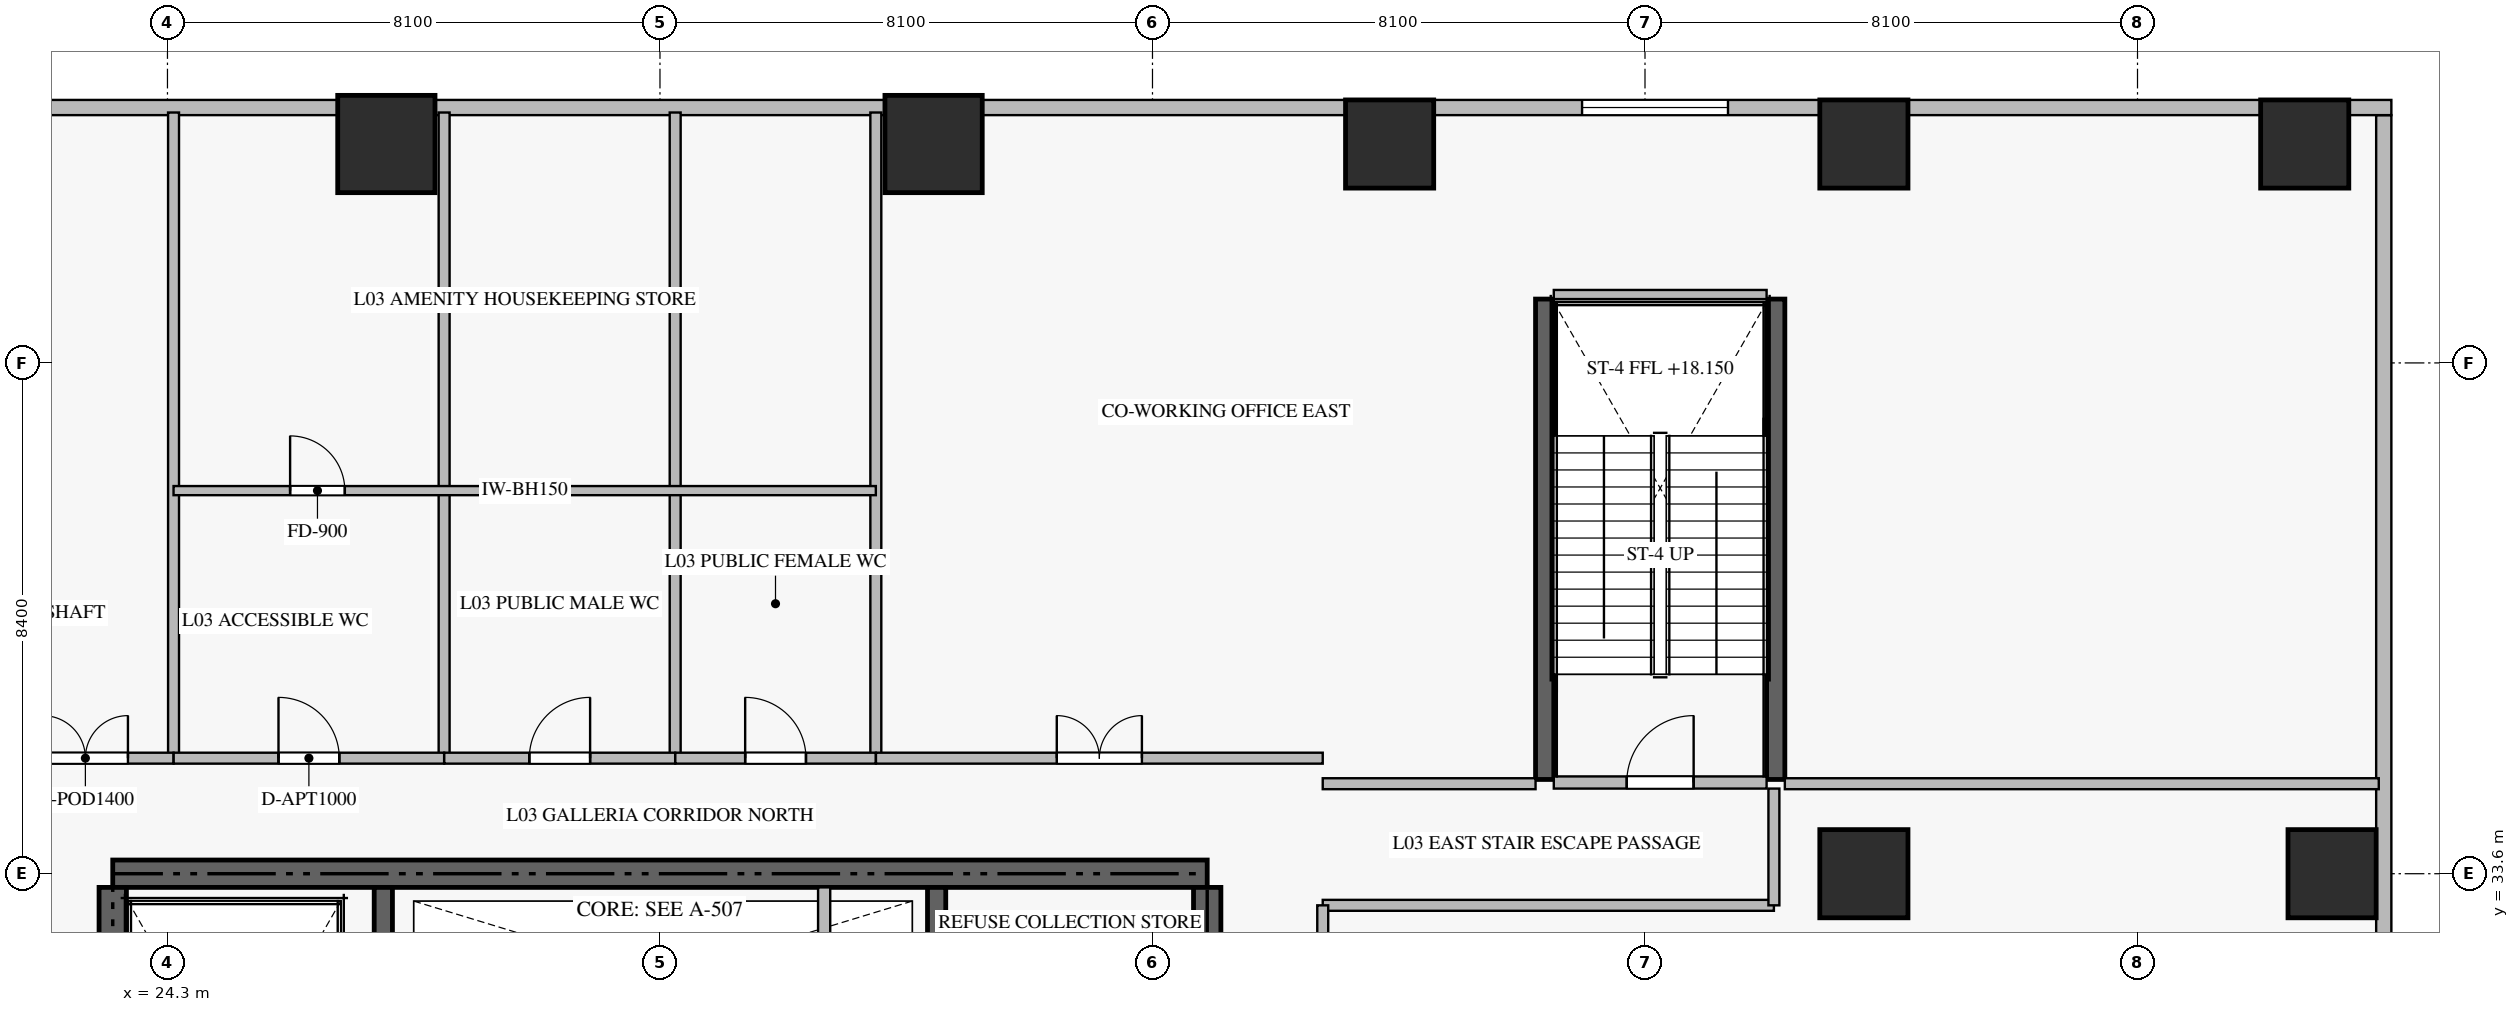
"""IFC4 building model, lengths in metres.
Left out: names, types, materials, properties, quantities, classifications, styles, units other than length and angle.
Written with IfcOpenShell. Run it as: python <this file> out.ifc"""

import sys

from ifc_helpers import new_model, si_unit, direction, frame, frame_2d, origin, origin_2d, place, context, subcontext, project, spatial, rectangle, extrude, source, transform, mapped, element, fill, save


model = new_model("IFC4")
c1 = context("Model", 3, precision=1e-05, world=origin(), true_north=direction((0.0, 1.0)))
c2 = subcontext(c1, "Body", "Model", "MODEL_VIEW")
j1 = project(units=[si_unit("LENGTHUNIT", "METRE"), si_unit("PLANEANGLEUNIT", "RADIAN")], contexts=[c1])
p1 = place(None, origin())
s1 = spatial("IfcSite", under=j1, at=p1, CompositionType="ELEMENT")
p2 = place(p1, origin())
s2 = spatial("IfcBuilding", under=s1, at=p2, CompositionType="ELEMENT")
p3 = place(p2, frame((0.0, 0.0, 15.3)))
s3 = spatial("IfcBuildingStorey", under=s2, at=p3, CompositionType="ELEMENT", Elevation=15.3)
p4 = place(p3, frame((41.4, 33.6, -0.38), z_axis=(0.0, 0.0, 1.0), x_axis=(-1.0, 0.0, 0.0)))
e1 = element("IfcWall", 1, at=p4, inside=s3, PredefinedType="SHEAR", context=c2, shape_type="SweptSolid", body=[
    extrude(rectangle(XDim=18.0, YDim=0.45, at=frame_2d((9.0, 0.0))), origin(), (0.0, 0.0, 1.0), 5.228),
])
p5 = place(p3, frame((23.4, 24.25, -0.38), z_axis=(0.0, 0.0, 1.0), x_axis=(0.0, 1.0, 0.0)))
e2 = element("IfcWall", 2, at=p5, inside=s3, PredefinedType="SHEAR", context=c2, shape_type="SweptSolid", body=[
    extrude(rectangle(XDim=9.125, YDim=0.45, at=frame_2d((4.562, 0.0))), origin(), (0.0, 0.0, 1.0), 5.228),
])
p6 = place(p3, frame((41.4, 27.75, -0.38), z_axis=(0.0, 0.0, 1.0), x_axis=(0.0, 1.0, 0.0)))
e3 = element("IfcWall", 3, at=p6, inside=s3, PredefinedType="SHEAR", context=c2, shape_type="SweptSolid", body=[
    extrude(rectangle(XDim=5.625, YDim=0.45, at=frame_2d((2.812, 0.0))), origin(), (0.0, 0.0, 1.0), 5.228),
])
p7 = place(p3, frame((27.85, 23.55, -0.38), z_axis=(0.0, 0.0, 1.0), x_axis=(0.0, 1.0, 0.0)))
e4 = element("IfcWall", 4, at=p7, inside=s3, PredefinedType="SHEAR", context=c2, shape_type="SweptSolid", body=[
    extrude(rectangle(XDim=9.825, YDim=0.3, at=frame_2d((4.913, 0.0))), origin(), (0.0, 0.0, 1.0), 5.228),
])
p8 = place(p3, frame((36.95, 27.05, -0.38), z_axis=(0.0, 0.0, 1.0), x_axis=(0.0, 1.0, 0.0)))
e5 = element("IfcWall", 5, at=p8, inside=s3, PredefinedType="SHEAR", context=c2, shape_type="SweptSolid", body=[
    extrude(rectangle(XDim=6.325, YDim=0.3, at=frame_2d((3.163, 0.0))), origin(), (0.0, 0.0, 1.0), 5.228),
])
m1 = source(origin(), c2, "Body", "SweptSolid", [
    extrude(rectangle(XDim=1.6, YDim=1.6, at=origin_2d()), origin(), (0.0, 0.0, 1.0), 5.23),
])
for number, where, z_axis, x_axis in (
    (6, (27.9, 45.6, -0.38), (0.0, 0.0, 1.0), (1.0, 0.0, 0.0)),
    (7, (36.9, 45.6, -0.38), (0.0, 0.0, 1.0), (1.0, 0.0, 0.0)),
):
    element("IfcColumn", number, at=place(p3, frame(where, z_axis=z_axis, x_axis=x_axis)), inside=s3, PredefinedType="COLUMN", context=c2, shape_type="MappedRepresentation", body=[
        mapped(m1, transform((0.0, 0.0, 0.0), scale=1.0)),
    ])
m2 = source(origin(), c2, "Body", "SweptSolid", [
    extrude(rectangle(XDim=1.45, YDim=1.45, at=origin_2d()), origin(), (0.0, 0.0, 1.0), 5.23),
])
for number, where, z_axis, x_axis in (
    (8, (44.4, 45.6, -0.38), (0.0, 0.0, 1.0), (1.0, 0.0, 0.0)),
    (9, (52.2, 45.6, -0.38), (0.0, 0.0, 1.0), (1.0, 0.0, 0.0)),
    (10, (52.2, 33.6, -0.38), (0.0, 0.0, 1.0), (1.0, 0.0, 0.0)),
    (11, (59.9, 33.6, -0.38), (0.0, 0.0, 1.0), (1.0, 0.0, 0.0)),
    (12, (59.45, 45.6, -0.38), (0.0, 0.0, 1.0), (1.0, 0.0, 0.0)),
):
    element("IfcColumn", number, at=place(p3, frame(where, z_axis=z_axis, x_axis=x_axis)), inside=s3, PredefinedType="COLUMN", context=c2, shape_type="MappedRepresentation", body=[
        mapped(m2, transform((0.0, 0.0, 0.0), scale=1.0)),
    ])
p9 = place(p3, frame((60.75, 4.325, 0.0), z_axis=(0.0, 0.0, 1.0), x_axis=(0.0, 1.0, 0.0)))
e13 = element("IfcWall", 13, at=p9, inside=s3, PredefinedType="ELEMENTEDWALL", context=c2, shape_type="SweptSolid", body=[
    extrude(rectangle(XDim=41.75, YDim=0.25, at=frame_2d((20.875, 0.0))), origin(), (0.0, 0.0, 1.0), 4.835),
])
p10 = place(p9, frame((14.953, 0.0, 0.6)))
e14 = element("IfcOpeningElement", 14, at=p10, cuts=e13, PredefinedType="OPENING", context=c2, shape_type="SweptSolid", body=[
    extrude(rectangle(XDim=2.4, YDim=2.6, at=frame_2d((1.2, 1.3))), frame((0.0, 0.135, 0.0), z_axis=(0.0, -1.0, 0.0), x_axis=(1.0, 0.0, 0.0)), (0.0, 0.0, 1.0), 0.27),
])
p11 = place(p9, frame((24.397, 0.0, 0.6)))
e15 = element("IfcOpeningElement", 15, at=p11, cuts=e13, PredefinedType="OPENING", context=c2, shape_type="SweptSolid", body=[
    extrude(rectangle(XDim=2.4, YDim=2.6, at=frame_2d((1.2, 1.3))), frame((0.0, 0.135, 0.0), z_axis=(0.0, -1.0, 0.0), x_axis=(1.0, 0.0, 0.0)), (0.0, 0.0, 1.0), 0.27),
])
p12 = place(p3, frame((60.875, 46.2, 0.0), z_axis=(0.0, 0.0, 1.0), x_axis=(-1.0, 0.0, 0.0)))
e16 = element("IfcWall", 16, at=p12, inside=s3, PredefinedType="ELEMENTEDWALL", context=c2, shape_type="SweptSolid", body=[
    extrude(rectangle(XDim=56.95, YDim=0.25, at=frame_2d((28.475, 0.0))), origin(), (0.0, 0.0, 1.0), 4.835),
])
p13 = place(p12, frame((10.91, 0.0, 0.6)))
e17 = element("IfcOpeningElement", 17, at=p13, cuts=e16, PredefinedType="OPENING", context=c2, shape_type="SweptSolid", body=[
    extrude(rectangle(XDim=2.4, YDim=2.6, at=frame_2d((1.2, 1.3))), frame((0.0, 0.135, 0.0), z_axis=(0.0, -1.0, 0.0), x_axis=(1.0, 0.0, 0.0)), (0.0, 0.0, 1.0), 0.27),
])
p14 = place(p12, frame((43.64, 0.0, 0.6)))
e18 = element("IfcOpeningElement", 18, at=p14, cuts=e16, PredefinedType="OPENING", context=c2, shape_type="SweptSolid", body=[
    extrude(rectangle(XDim=2.4, YDim=2.6, at=frame_2d((1.2, 1.3))), frame((0.0, 0.135, 0.0), z_axis=(0.0, -1.0, 0.0), x_axis=(1.0, 0.0, 0.0)), (0.0, 0.0, 1.0), 0.27),
])
for number, where, z_axis, x_axis in (
    (19, (46.95, 35.15, -0.38), (0.0, 0.0, 1.0), (0.0, 1.0, 0.0)),
    (20, (50.75, 35.15, -0.38), (0.0, 0.0, 1.0), (0.0, 1.0, 0.0)),
):
    element("IfcWall", number, at=place(p3, frame(where, z_axis=z_axis, x_axis=x_axis)), inside=s3, PredefinedType="SHEAR", context=c2, shape_type="SweptSolid", body=[
        extrude(rectangle(XDim=7.9, YDim=0.3, at=frame_2d((3.95, 0.0))), origin(), (0.0, 0.0, 1.0), 5.228),
    ])
p15 = place(p3, frame((47.1, 35.1, 0.0), z_axis=(0.0, 0.0, 1.0), x_axis=(1.0, 0.0, 0.0)))
e21 = element("IfcWall", 21, at=p15, inside=s3, PredefinedType="STANDARD", context=c2, shape_type="SweptSolid", body=[
    extrude(rectangle(XDim=3.5, YDim=0.2, at=frame_2d((1.75, 0.0))), origin(), (0.0, 0.0, 1.0), 4.85),
])
p16 = place(p15, frame((1.2, 0.0, 0.0)))
e22 = element("IfcOpeningElement", 22, at=p16, cuts=e21, PredefinedType="OPENING", context=c2, shape_type="SweptSolid", body=[
    extrude(rectangle(XDim=1.1, YDim=2.15, at=frame_2d((0.55, 1.075))), frame((0.0, 0.11, 0.0), z_axis=(0.0, -1.0, 0.0), x_axis=(1.0, 0.0, 0.0)), (0.0, 0.0, 1.0), 0.22),
])
p17 = place(p3, frame((47.1, 43.1, 0.0), z_axis=(0.0, 0.0, 1.0), x_axis=(1.0, 0.0, 0.0)))
e23 = element("IfcWall", 23, at=p17, inside=s3, PredefinedType="STANDARD", context=c2, shape_type="SweptSolid", body=[
    extrude(rectangle(XDim=3.5, YDim=0.2, at=frame_2d((1.75, 0.0))), origin(), (0.0, 0.0, 1.0), 2.335),
])
p18 = place(p3, frame((35.1, 30.75, 0.0), z_axis=(0.0, 0.0, 1.0), x_axis=(0.0, 1.0, 0.0)))
e24 = element("IfcWall", 24, at=p18, inside=s3, PredefinedType="STANDARD", context=c2, shape_type="SweptSolid", body=[
    extrude(rectangle(XDim=2.625, YDim=0.2, at=frame_2d((1.312, 0.0))), origin(), (0.0, 0.0, 1.0), 4.85),
])
p19 = place(p3, frame((43.3, 35.08, 0.0), z_axis=(0.0, 0.0, 1.0), x_axis=(1.0, 0.0, 0.0)))
e25 = element("IfcWall", 25, at=p19, inside=s3, PredefinedType="PARTITIONING", context=c2, shape_type="SweptSolid", body=[
    extrude(rectangle(XDim=3.5, YDim=0.18, at=frame_2d((1.75, 0.0))), origin(), (0.0, 0.0, 1.0), 4.85),
])
p20 = place(p3, frame((43.3, 33.08, 0.0), z_axis=(0.0, 0.0, 1.0), x_axis=(1.0, 0.0, 0.0)))
e26 = element("IfcWall", 26, at=p20, inside=s3, PredefinedType="PARTITIONING", context=c2, shape_type="SweptSolid", body=[
    extrude(rectangle(XDim=7.42, YDim=0.18, at=frame_2d((3.71, 0.0))), origin(), (0.0, 0.0, 1.0), 4.85),
])
p21 = place(p3, frame((50.9, 35.08, 0.0), z_axis=(0.0, 0.0, 1.0), x_axis=(1.0, 0.0, 0.0)))
e27 = element("IfcWall", 27, at=p21, inside=s3, PredefinedType="PARTITIONING", context=c2, shape_type="SweptSolid", body=[
    extrude(rectangle(XDim=9.768, YDim=0.18, at=frame_2d((4.884, 0.0))), origin(), (0.0, 0.0, 1.0), 4.85),
])
p22 = place(p3, frame((50.72, 33.08, 0.0), z_axis=(0.0, 0.0, 1.0), x_axis=(0.0, 1.0, 0.0)))
e28 = element("IfcWall", 28, at=p22, inside=s3, PredefinedType="PARTITIONING", context=c2, shape_type="SweptSolid", body=[
    extrude(rectangle(XDim=1.92, YDim=0.18, at=frame_2d((0.96, 0.0))), origin(), (0.0, 0.0, 1.0), 4.85),
])
p23 = place(p3, frame((43.3, 14.9, 0.0), z_axis=(0.0, 0.0, 1.0), x_axis=(0.0, 1.0, 0.0)))
e29 = element("IfcWall", 29, at=p23, inside=s3, PredefinedType="PARTITIONING", context=c2, shape_type="SweptSolid", body=[
    extrude(rectangle(XDim=18.18, YDim=0.18, at=frame_2d((9.09, 0.0))), origin(), (0.0, 0.0, 1.0), 4.85),
])
p24 = place(p23, frame((8.34, 0.0, 0.0)))
e30 = element("IfcOpeningElement", 30, at=p24, cuts=e29, PredefinedType="OPENING", context=c2, shape_type="SweptSolid", body=[
    extrude(rectangle(XDim=1.5, YDim=2.25, at=frame_2d((0.75, 1.125))), frame((0.0, 0.1, 0.0), z_axis=(0.0, -1.0, 0.0), x_axis=(1.0, 0.0, 0.0)), (0.0, 0.0, 1.0), 0.2),
])
for number, where, z_axis, x_axis in (
    (31, (24.4, 35.5, 0.0), (0.0, 0.0, 1.0), (0.0, 1.0, 0.0)),
    (32, (28.85, 35.5, 0.0), (0.0, 0.0, 1.0), (0.0, 1.0, 0.0)),
    (33, (32.65, 35.5, 0.0), (0.0, 0.0, 1.0), (0.0, 1.0, 0.0)),
    (34, (35.95, 35.5, 0.0), (0.0, 0.0, 1.0), (0.0, 1.0, 0.0)),
):
    element("IfcWall", number, at=place(p3, frame(where, z_axis=z_axis, x_axis=x_axis)), inside=s3, PredefinedType="PARTITIONING", context=c2, shape_type="SweptSolid", body=[
        extrude(rectangle(XDim=10.618, YDim=0.18, at=frame_2d((5.309, 0.0))), origin(), (0.0, 0.0, 1.0), 4.85),
    ])
p25 = place(p3, frame((21.5, 35.5, 0.0), z_axis=(0.0, 0.0, 1.0), x_axis=(1.0, 0.0, 0.0)))
e35 = element("IfcWall", 35, at=p25, inside=s3, PredefinedType="PARTITIONING", context=c2, shape_type="SweptSolid", body=[
    extrude(rectangle(XDim=2.9, YDim=0.18, at=frame_2d((1.45, 0.0))), origin(), (0.0, 0.0, 1.0), 4.85),
])
p26 = place(p25, frame((0.75, 0.0, 0.0)))
e36 = element("IfcOpeningElement", 36, at=p26, cuts=e35, PredefinedType="OPENING", context=c2, shape_type="SweptSolid", body=[
    extrude(rectangle(XDim=1.4, YDim=2.25, at=frame_2d((0.7, 1.125))), frame((0.0, 0.1, 0.0), z_axis=(0.0, -1.0, 0.0), x_axis=(1.0, 0.0, 0.0)), (0.0, 0.0, 1.0), 0.2),
])
p27 = place(p3, frame((24.402, 35.5, 0.0), z_axis=(0.0, 0.0, 1.0), x_axis=(1.0, 0.0, 0.0)))
e37 = element("IfcWall", 37, at=p27, inside=s3, PredefinedType="PARTITIONING", context=c2, shape_type="SweptSolid", body=[
    extrude(rectangle(XDim=4.448, YDim=0.18, at=frame_2d((2.224, 0.0))), origin(), (0.0, 0.0, 1.0), 4.85),
])
p28 = place(p27, frame((1.724, 0.0, 0.0)))
e38 = element("IfcOpeningElement", 38, at=p28, cuts=e37, PredefinedType="OPENING", context=c2, shape_type="SweptSolid", body=[
    extrude(rectangle(XDim=1.0, YDim=2.15, at=frame_2d((0.5, 1.075))), frame((0.0, 0.1, 0.0), z_axis=(0.0, -1.0, 0.0), x_axis=(1.0, 0.0, 0.0)), (0.0, 0.0, 1.0), 0.2),
])
p29 = place(p3, frame((28.852, 35.5, 0.0), z_axis=(0.0, 0.0, 1.0), x_axis=(1.0, 0.0, 0.0)))
e39 = element("IfcWall", 39, at=p29, inside=s3, PredefinedType="PARTITIONING", context=c2, shape_type="SweptSolid", body=[
    extrude(rectangle(XDim=3.798, YDim=0.18, at=frame_2d((1.899, 0.0))), origin(), (0.0, 0.0, 1.0), 4.85),
])
p30 = place(p29, frame((1.399, 0.0, 0.0)))
e40 = element("IfcOpeningElement", 40, at=p30, cuts=e39, PredefinedType="OPENING", context=c2, shape_type="SweptSolid", body=[
    extrude(rectangle(XDim=1.0, YDim=2.15, at=frame_2d((0.5, 1.075))), frame((0.0, 0.1, 0.0), z_axis=(0.0, -1.0, 0.0), x_axis=(1.0, 0.0, 0.0)), (0.0, 0.0, 1.0), 0.2),
])
p31 = place(p3, frame((32.652, 35.5, 0.0), z_axis=(0.0, 0.0, 1.0), x_axis=(1.0, 0.0, 0.0)))
e41 = element("IfcWall", 41, at=p31, inside=s3, PredefinedType="PARTITIONING", context=c2, shape_type="SweptSolid", body=[
    extrude(rectangle(XDim=3.298, YDim=0.18, at=frame_2d((1.649, 0.0))), origin(), (0.0, 0.0, 1.0), 4.85),
])
p32 = place(p31, frame((1.149, 0.0, 0.0)))
e42 = element("IfcOpeningElement", 42, at=p32, cuts=e41, PredefinedType="OPENING", context=c2, shape_type="SweptSolid", body=[
    extrude(rectangle(XDim=1.0, YDim=2.15, at=frame_2d((0.5, 1.075))), frame((0.0, 0.1, 0.0), z_axis=(0.0, -1.0, 0.0), x_axis=(1.0, 0.0, 0.0)), (0.0, 0.0, 1.0), 0.2),
])
p33 = place(p3, frame((35.952, 35.5, 0.0), z_axis=(0.0, 0.0, 1.0), x_axis=(1.0, 0.0, 0.0)))
e43 = element("IfcWall", 43, at=p33, inside=s3, PredefinedType="PARTITIONING", context=c2, shape_type="SweptSolid", body=[
    extrude(rectangle(XDim=7.348, YDim=0.18, at=frame_2d((3.674, 0.0))), origin(), (0.0, 0.0, 1.0), 4.85),
])
p34 = place(p33, frame((2.974, 0.0, 0.0)))
e44 = element("IfcOpeningElement", 44, at=p34, cuts=e43, PredefinedType="OPENING", context=c2, shape_type="SweptSolid", body=[
    extrude(rectangle(XDim=1.4, YDim=2.25, at=frame_2d((0.7, 1.125))), frame((0.0, 0.1, 0.0), z_axis=(0.0, -1.0, 0.0), x_axis=(1.0, 0.0, 0.0)), (0.0, 0.0, 1.0), 0.2),
])
p35 = place(p3, frame((24.4, 39.9, 0.0), z_axis=(0.0, 0.0, 1.0), x_axis=(1.0, 0.0, 0.0)))
e45 = element("IfcWall", 45, at=p35, inside=s3, PredefinedType="PARTITIONING", context=c2, shape_type="SweptSolid", body=[
    extrude(rectangle(XDim=11.55, YDim=0.15, at=frame_2d((5.775, 0.0))), origin(), (0.0, 0.0, 1.0), 4.85),
])
p36 = place(p35, frame((1.917, 0.0, 0.0)))
e46 = element("IfcOpeningElement", 46, at=p36, cuts=e45, PredefinedType="OPENING", context=c2, shape_type="SweptSolid", body=[
    extrude(rectangle(XDim=0.9, YDim=2.1, at=frame_2d((0.45, 1.05))), frame((0.0, 0.085, 0.0), z_axis=(0.0, -1.0, 0.0), x_axis=(1.0, 0.0, 0.0)), (0.0, 0.0, 1.0), 0.17),
])
m3 = source(origin(), c2, "Body", "SweptSolid", [
    extrude(rectangle(XDim=2.4, YDim=2.6, at=frame_2d((1.2, 1.3))), frame((0.0, 0.03, 0.0), z_axis=(0.0, -1.0, 0.0), x_axis=(1.0, 0.0, 0.0)), (0.0, 0.0, 1.0), 0.06),
])
p37 = place(p13, origin())
e47 = element("IfcWindow", 47, at=p37, inside=s3, PartitioningType="SINGLE_PANEL", PredefinedType="WINDOW", context=c2, shape_type="MappedRepresentation", body=[
    mapped(m3, transform((0.0, 0.0, 0.0), scale=1.0)),
])
fill(e17, e47)
m4 = source(origin(), c2, "Body", "SweptSolid", [
    extrude(rectangle(XDim=1.1, YDim=2.15, at=frame_2d((0.55, 1.075))), frame((0.0, 0.025, 0.0), z_axis=(0.0, -1.0, 0.0), x_axis=(1.0, 0.0, 0.0)), (0.0, 0.0, 1.0), 0.05),
])
p38 = place(p16, origin())
e48 = element("IfcDoor", 48, at=p38, inside=s3, OperationType="SINGLE_SWING_RIGHT", PredefinedType="DOOR", context=c2, shape_type="MappedRepresentation", body=[
    mapped(m4, transform((0.0, 0.0, 0.0), scale=1.0)),
])
fill(e22, e48)
m5 = source(origin(), c2, "Body", "SweptSolid", [
    extrude(rectangle(XDim=1.4, YDim=2.25, at=frame_2d((0.7, 1.125))), frame((0.0, 0.025, 0.0), z_axis=(0.0, -1.0, 0.0), x_axis=(1.0, 0.0, 0.0)), (0.0, 0.0, 1.0), 0.05),
])
p39 = place(p26, origin())
e49 = element("IfcDoor", 49, at=p39, inside=s3, OperationType="DOUBLE_DOOR_SINGLE_SWING", PredefinedType="DOOR", context=c2, shape_type="MappedRepresentation", body=[
    mapped(m5, transform((0.0, 0.0, 0.0), scale=1.0)),
])
fill(e36, e49)
m6 = source(origin(), c2, "Body", "SweptSolid", [
    extrude(rectangle(XDim=1.0, YDim=2.15, at=frame_2d((0.5, 1.075))), frame((0.0, 0.025, 0.0), z_axis=(0.0, -1.0, 0.0), x_axis=(1.0, 0.0, 0.0)), (0.0, 0.0, 1.0), 0.05),
])
p40 = place(p28, origin())
e50 = element("IfcDoor", 50, at=p40, inside=s3, OperationType="SINGLE_SWING_LEFT", PredefinedType="DOOR", context=c2, shape_type="MappedRepresentation", body=[
    mapped(m6, transform((0.0, 0.0, 0.0), scale=1.0)),
])
fill(e38, e50)
p41 = place(p30, origin())
e51 = element("IfcDoor", 51, at=p41, inside=s3, OperationType="SINGLE_SWING_RIGHT", PredefinedType="DOOR", context=c2, shape_type="MappedRepresentation", body=[
    mapped(m6, transform((0.0, 0.0, 0.0), scale=1.0)),
])
fill(e40, e51)
p42 = place(p32, origin())
e52 = element("IfcDoor", 52, at=p42, inside=s3, OperationType="SINGLE_SWING_LEFT", PredefinedType="DOOR", context=c2, shape_type="MappedRepresentation", body=[
    mapped(m6, transform((0.0, 0.0, 0.0), scale=1.0)),
])
fill(e42, e52)
p43 = place(p34, origin())
e53 = element("IfcDoor", 53, at=p43, inside=s3, OperationType="DOUBLE_DOOR_SINGLE_SWING", PredefinedType="DOOR", context=c2, shape_type="MappedRepresentation", body=[
    mapped(m5, transform((0.0, 0.0, 0.0), scale=1.0)),
])
fill(e44, e53)
m7 = source(origin(), c2, "Body", "SweptSolid", [
    extrude(rectangle(XDim=0.9, YDim=2.1, at=frame_2d((0.45, 1.05))), frame((0.0, 0.025, 0.0), z_axis=(0.0, -1.0, 0.0), x_axis=(1.0, 0.0, 0.0)), (0.0, 0.0, 1.0), 0.05),
])
p44 = place(p36, origin())
e54 = element("IfcDoor", 54, at=p44, inside=s3, OperationType="SINGLE_SWING_LEFT", PredefinedType="DOOR", context=c2, shape_type="MappedRepresentation", body=[
    mapped(m7, transform((0.0, 0.0, 0.0), scale=1.0)),
])
fill(e46, e54)
save(model, sys.argv[1])
